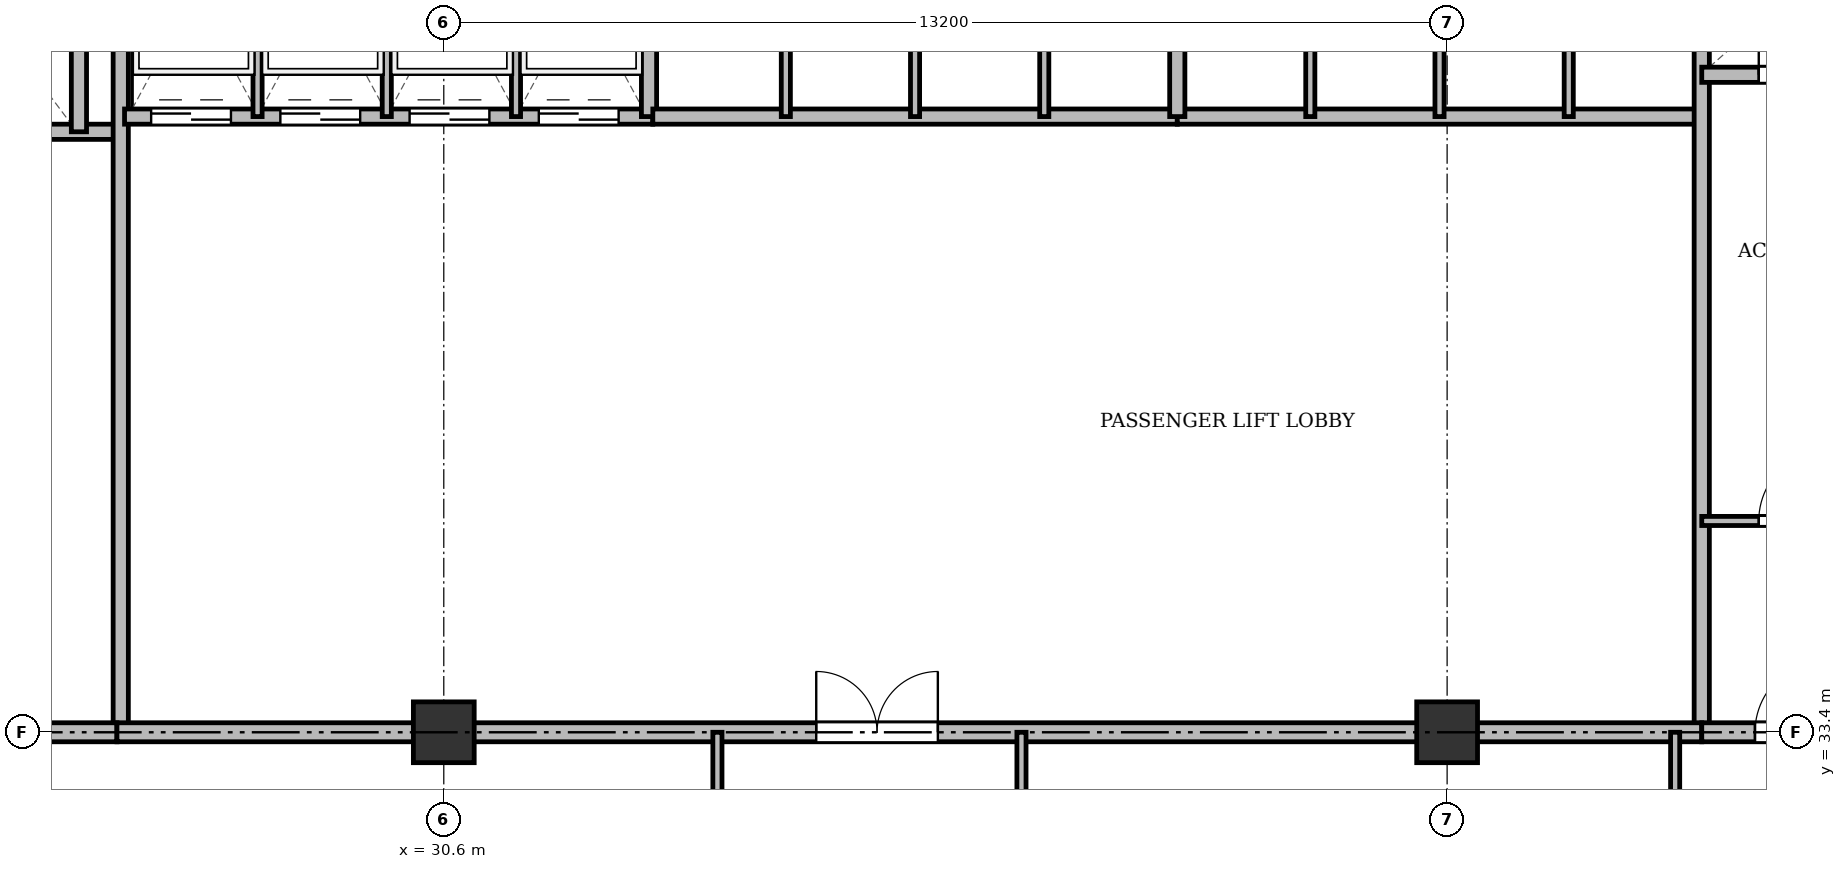
"""IFC4 building model, lengths in metres.
Left out: names, types, materials, properties, quantities, classifications, styles, units other than length and angle.
Written with IfcOpenShell. Run it as: python <this file> out.ifc"""

import sys

from ifc_helpers import new_model, si_unit, direction, frame, frame_2d, origin, origin_2d, place, context, subcontext, project, spatial, rectangle, extrude, source, transform, mapped, element, fill, save


model = new_model("IFC4")
c1 = context("Model", 3, precision=1e-05, world=origin(), true_north=direction((0.0, 1.0)))
c2 = subcontext(c1, "Body", "Model", "MODEL_VIEW")
j1 = project(units=[si_unit("LENGTHUNIT", "METRE"), si_unit("PLANEANGLEUNIT", "RADIAN")], contexts=[c1])
p1 = place(None, origin())
s1 = spatial("IfcSite", under=j1, at=p1, CompositionType="ELEMENT")
p2 = place(p1, origin())
s2 = spatial("IfcBuilding", under=s1, at=p2, CompositionType="ELEMENT")
p3 = place(p2, frame((0.0, 0.0, 81.7)))
s3 = spatial("IfcBuildingStorey", under=s2, at=p3, CompositionType="ELEMENT", Elevation=81.7)
m1 = source(origin(), c2, "Body", "SweptSolid", [
    extrude(rectangle(XDim=0.8, YDim=0.8, at=origin_2d()), origin(), (0.0, 0.0, 1.0), 3.6),
])
for number, where, z_axis, x_axis in (
    (1, (30.6, 33.4, 0.0), (0.0, 0.0, 1.0), (1.0, 0.0, 0.0)),
    (2, (43.8, 33.4, 0.0), (0.0, 0.0, 1.0), (1.0, 0.0, 0.0)),
):
    element("IfcColumn", number, at=place(p3, frame(where, z_axis=z_axis, x_axis=x_axis)), inside=s3, PredefinedType="COLUMN", context=c2, shape_type="MappedRepresentation", body=[
        mapped(m1, transform((0.0, 0.0, 0.0), x_axis=(1.0, 0.0, 0.0), y_axis=(0.0, 1.0, 0.0), z_axis=(0.0, 0.0, 1.0), scale=1.0)),
    ])
p4 = place(p3, frame((19.55, 41.3, 0.0), z_axis=(0.0, 0.0, 1.0), x_axis=(1.0, 0.0, 0.0)))
e3 = element("IfcWall", 3, at=p4, inside=s3, PredefinedType="SOLIDWALL", context=c2, shape_type="SweptSolid", body=[
    extrude(rectangle(XDim=6.75, YDim=0.2, at=frame_2d((3.375, 0.0))), origin(), (0.0, 0.0, 1.0), 3.34),
])
p5 = place(p4, frame((1.7, 0.0, 0.0)))
e4 = element("IfcOpeningElement", 4, at=p5, cuts=e3, PredefinedType="OPENING", context=c2, shape_type="SweptSolid", body=[
    extrude(rectangle(XDim=1.1, YDim=2.15, at=frame_2d((0.55, 1.075))), frame((0.0, 0.11, 0.0), z_axis=(0.0, -1.0, 0.0), x_axis=(1.0, 0.0, 0.0)), (0.0, 0.0, 1.0), 0.22),
])
p6 = place(p4, frame((4.4, 0.0, 0.0)))
e5 = element("IfcOpeningElement", 5, at=p6, cuts=e3, PredefinedType="OPENING", context=c2, shape_type="SweptSolid", body=[
    extrude(rectangle(XDim=1.1, YDim=2.15, at=frame_2d((0.55, 1.075))), frame((0.0, 0.11, 0.0), z_axis=(0.0, -1.0, 0.0), x_axis=(1.0, 0.0, 0.0)), (0.0, 0.0, 1.0), 0.22),
])
p7 = place(p3, frame((25.8, 41.3, 0.0), z_axis=(0.0, 0.0, 1.0), x_axis=(0.0, 1.0, 0.0)))
e6 = element("IfcWall", 6, at=p7, inside=s3, PredefinedType="SOLIDWALL", context=c2, shape_type="SweptSolid", body=[
    extrude(rectangle(XDim=3.4, YDim=0.2, at=frame_2d((1.7, 0.0))), origin(), (0.0, 0.0, 1.0), 3.34),
])
p8 = place(p3, frame((26.35, 33.4, 0.0), z_axis=(0.0, 0.0, 1.0), x_axis=(0.0, 1.0, 0.0)))
e7 = element("IfcWall", 7, at=p8, inside=s3, PredefinedType="SOLIDWALL", context=c2, shape_type="SweptSolid", body=[
    extrude(rectangle(XDim=11.3, YDim=0.2, at=frame_2d((5.65, 0.0))), origin(), (0.0, 0.0, 1.0), 2.752),
])
p9 = place(p3, frame((19.5, 33.4, 0.0), z_axis=(0.0, 0.0, 1.0), x_axis=(1.0, 0.0, 0.0)))
e8 = element("IfcWall", 8, at=p9, inside=s3, PredefinedType="PARTITIONING", context=c2, shape_type="SweptSolid", body=[
    extrude(rectangle(XDim=6.8, YDim=0.25, at=frame_2d((3.4, 0.0))), origin(), (0.0, 0.0, 1.0), 2.752),
])
p10 = place(p9, frame((0.75, 0.0, 0.0)))
e9 = element("IfcOpeningElement", 9, at=p10, cuts=e8, PredefinedType="OPENING", context=c2, shape_type="SweptSolid", body=[
    extrude(rectangle(XDim=1.6, YDim=2.2, at=frame_2d((0.8, 1.1))), frame((0.0, 0.135, 0.0), z_axis=(0.0, -1.0, 0.0), x_axis=(1.0, 0.0, 0.0)), (0.0, 0.0, 1.0), 0.27),
])
p11 = place(p3, frame((26.4, 41.5, 0.0), z_axis=(0.0, 0.0, 1.0), x_axis=(1.0, 0.0, 0.0)))
e10 = element("IfcWall", 10, at=p11, inside=s3, PredefinedType="SOLIDWALL", context=c2, shape_type="SweptSolid", body=[
    extrude(rectangle(XDim=6.95, YDim=0.2, at=frame_2d((3.475, 0.0))), origin(), (0.0, 0.0, 1.0), 3.34),
])
p12 = place(p11, frame((0.35, 0.0, 0.0)))
e11 = element("IfcOpeningElement", 11, at=p12, cuts=e10, PredefinedType="OPENING", context=c2, shape_type="SweptSolid", body=[
    extrude(rectangle(XDim=1.05, YDim=2.15, at=frame_2d((0.525, 1.075))), frame((0.0, 0.11, 0.0), z_axis=(0.0, -1.0, 0.0), x_axis=(1.0, 0.0, 0.0)), (0.0, 0.0, 1.0), 0.22),
])
p13 = place(p11, frame((2.05, 0.0, 0.0)))
e12 = element("IfcOpeningElement", 12, at=p13, cuts=e10, PredefinedType="OPENING", context=c2, shape_type="SweptSolid", body=[
    extrude(rectangle(XDim=1.05, YDim=2.15, at=frame_2d((0.525, 1.075))), frame((0.0, 0.11, 0.0), z_axis=(0.0, -1.0, 0.0), x_axis=(1.0, 0.0, 0.0)), (0.0, 0.0, 1.0), 0.22),
])
p14 = place(p11, frame((3.75, 0.0, 0.0)))
e13 = element("IfcOpeningElement", 13, at=p14, cuts=e10, PredefinedType="OPENING", context=c2, shape_type="SweptSolid", body=[
    extrude(rectangle(XDim=1.05, YDim=2.15, at=frame_2d((0.525, 1.075))), frame((0.0, 0.11, 0.0), z_axis=(0.0, -1.0, 0.0), x_axis=(1.0, 0.0, 0.0)), (0.0, 0.0, 1.0), 0.22),
])
p15 = place(p11, frame((5.45, 0.0, 0.0)))
e14 = element("IfcOpeningElement", 14, at=p15, cuts=e10, PredefinedType="OPENING", context=c2, shape_type="SweptSolid", body=[
    extrude(rectangle(XDim=1.05, YDim=2.15, at=frame_2d((0.525, 1.075))), frame((0.0, 0.11, 0.0), z_axis=(0.0, -1.0, 0.0), x_axis=(1.0, 0.0, 0.0)), (0.0, 0.0, 1.0), 0.22),
])
p16 = place(p3, frame((33.3, 41.5, 0.0), z_axis=(0.0, 0.0, 1.0), x_axis=(0.0, 1.0, 0.0)))
e15 = element("IfcWall", 15, at=p16, inside=s3, PredefinedType="SOLIDWALL", context=c2, shape_type="SweptSolid", body=[
    extrude(rectangle(XDim=3.2, YDim=0.2, at=frame_2d((1.6, 0.0))), origin(), (0.0, 0.0, 1.0), 3.34),
])
for number, where, z_axis, x_axis in (
    (16, (28.15, 41.5, 0.0), (0.0, 0.0, 1.0), (0.0, 1.0, 0.0)),
    (17, (29.85, 41.5, 0.0), (0.0, 0.0, 1.0), (0.0, 1.0, 0.0)),
    (18, (31.55, 41.5, 0.0), (0.0, 0.0, 1.0), (0.0, 1.0, 0.0)),
):
    element("IfcWall", number, at=place(p3, frame(where, z_axis=z_axis, x_axis=x_axis)), inside=s3, PredefinedType="PARTITIONING", context=c2, shape_type="SweptSolid", body=[
        extrude(rectangle(XDim=3.2, YDim=0.12, at=frame_2d((1.6, 0.0))), origin(), (0.0, 0.0, 1.0), 3.34),
    ])
p17 = place(p3, frame((33.35, 41.5, 0.0), z_axis=(0.0, 0.0, 1.0), x_axis=(1.0, 0.0, 0.0)))
e19 = element("IfcWall", 19, at=p17, inside=s3, PredefinedType="SOLIDWALL", context=c2, shape_type="SweptSolid", body=[
    extrude(rectangle(XDim=6.9, YDim=0.2, at=frame_2d((3.45, 0.0))), origin(), (0.0, 0.0, 1.0), 3.34),
])
for number, where, z_axis, x_axis in (
    (20, (35.1, 41.5, 0.0), (0.0, 0.0, 1.0), (0.0, 1.0, 0.0)),
    (21, (36.8, 41.5, 0.0), (0.0, 0.0, 1.0), (0.0, 1.0, 0.0)),
    (22, (38.5, 41.5, 0.0), (0.0, 0.0, 1.0), (0.0, 1.0, 0.0)),
):
    element("IfcWall", number, at=place(p3, frame(where, z_axis=z_axis, x_axis=x_axis)), inside=s3, PredefinedType="PARTITIONING", context=c2, shape_type="SweptSolid", body=[
        extrude(rectangle(XDim=3.2, YDim=0.12, at=frame_2d((1.6, 0.0))), origin(), (0.0, 0.0, 1.0), 3.34),
    ])
p18 = place(p3, frame((40.25, 41.5, 0.0), z_axis=(0.0, 0.0, 1.0), x_axis=(1.0, 0.0, 0.0)))
e23 = element("IfcWall", 23, at=p18, inside=s3, PredefinedType="SOLIDWALL", context=c2, shape_type="SweptSolid", body=[
    extrude(rectangle(XDim=6.9, YDim=0.2, at=frame_2d((3.45, 0.0))), origin(), (0.0, 0.0, 1.0), 2.84),
])
p19 = place(p3, frame((40.25, 41.5, 0.0), z_axis=(0.0, 0.0, 1.0), x_axis=(0.0, 1.0, 0.0)))
e24 = element("IfcWall", 24, at=p19, inside=s3, PredefinedType="SOLIDWALL", context=c2, shape_type="SweptSolid", body=[
    extrude(rectangle(XDim=3.2, YDim=0.2, at=frame_2d((1.6, 0.0))), origin(), (0.0, 0.0, 1.0), 3.34),
])
p20 = place(p3, frame((42.0, 41.5, 0.0), z_axis=(0.0, 0.0, 1.0), x_axis=(0.0, 1.0, 0.0)))
e25 = element("IfcWall", 25, at=p20, inside=s3, PredefinedType="PARTITIONING", context=c2, shape_type="SweptSolid", body=[
    extrude(rectangle(XDim=3.2, YDim=0.12, at=frame_2d((1.6, 0.0))), origin(), (0.0, 0.0, 1.0), 3.34),
])
p21 = place(p3, frame((43.7, 41.5, 0.0), z_axis=(0.0, 0.0, 1.0), x_axis=(0.0, 1.0, 0.0)))
e26 = element("IfcWall", 26, at=p21, inside=s3, PredefinedType="PARTITIONING", context=c2, shape_type="SweptSolid", body=[
    extrude(rectangle(XDim=3.2, YDim=0.12, at=frame_2d((1.6, 0.0))), origin(), (0.0, 0.0, 1.0), 2.84),
])
p22 = place(p3, frame((45.4, 41.5, 0.0), z_axis=(0.0, 0.0, 1.0), x_axis=(0.0, 1.0, 0.0)))
e27 = element("IfcWall", 27, at=p22, inside=s3, PredefinedType="PARTITIONING", context=c2, shape_type="SweptSolid", body=[
    extrude(rectangle(XDim=3.2, YDim=0.12, at=frame_2d((1.6, 0.0))), origin(), (0.0, 0.0, 1.0), 3.34),
])
p23 = place(p3, frame((47.15, 33.4, 0.0), z_axis=(0.0, 0.0, 1.0), x_axis=(0.0, 1.0, 0.0)))
e28 = element("IfcWall", 28, at=p23, inside=s3, PredefinedType="SOLIDWALL", context=c2, shape_type="SweptSolid", body=[
    extrude(rectangle(XDim=11.3, YDim=0.2, at=frame_2d((5.65, 0.0))), origin(), (0.0, 0.0, 1.0), 2.752),
])
p24 = place(p3, frame((26.3, 33.4, 0.0), z_axis=(0.0, 0.0, 1.0), x_axis=(1.0, 0.0, 0.0)))
e29 = element("IfcWall", 29, at=p24, inside=s3, PredefinedType="PARTITIONING", context=c2, shape_type="SweptSolid", body=[
    extrude(rectangle(XDim=20.85, YDim=0.25, at=frame_2d((10.425, 0.0))), origin(), (0.0, 0.0, 1.0), 2.752),
])
p25 = place(p24, frame((9.2, 0.0, 0.0)))
e30 = element("IfcOpeningElement", 30, at=p25, cuts=e29, PredefinedType="OPENING", context=c2, shape_type="SweptSolid", body=[
    extrude(rectangle(XDim=1.6, YDim=2.2, at=frame_2d((0.8, 1.1))), frame((0.0, 0.135, 0.0), z_axis=(0.0, -1.0, 0.0), x_axis=(1.0, 0.0, 0.0)), (0.0, 0.0, 1.0), 0.27),
])
p26 = place(p3, frame((47.15, 42.05, 0.0), z_axis=(0.0, 0.0, 1.0), x_axis=(1.0, 0.0, 0.0)))
e31 = element("IfcWall", 31, at=p26, inside=s3, PredefinedType="SOLIDWALL", context=c2, shape_type="SweptSolid", body=[
    extrude(rectangle(XDim=7.85, YDim=0.2, at=frame_2d((3.925, 0.0))), origin(), (0.0, 0.0, 1.0), 2.84),
])
p27 = place(p26, frame((0.75, 0.0, 0.0)))
e32 = element("IfcOpeningElement", 32, at=p27, cuts=e31, PredefinedType="OPENING", context=c2, shape_type="SweptSolid", body=[
    extrude(rectangle(XDim=0.9, YDim=2.1, at=frame_2d((0.45, 1.05))), frame((0.0, 0.11, 0.0), z_axis=(0.0, -1.0, 0.0), x_axis=(1.0, 0.0, 0.0)), (0.0, 0.0, 1.0), 0.22),
])
p28 = place(p26, frame((3.85, 0.0, 0.0)))
e33 = element("IfcOpeningElement", 33, at=p28, cuts=e31, PredefinedType="OPENING", context=c2, shape_type="SweptSolid", body=[
    extrude(rectangle(XDim=0.9, YDim=2.1, at=frame_2d((0.45, 1.05))), frame((0.0, 0.11, 0.0), z_axis=(0.0, -1.0, 0.0), x_axis=(1.0, 0.0, 0.0)), (0.0, 0.0, 1.0), 0.22),
])
p29 = place(p3, frame((47.15, 36.18, 0.0), z_axis=(0.0, 0.0, 1.0), x_axis=(1.0, 0.0, 0.0)))
e34 = element("IfcWall", 34, at=p29, inside=s3, PredefinedType="PARTITIONING", context=c2, shape_type="SweptSolid", body=[
    extrude(rectangle(XDim=5.3, YDim=0.12, at=frame_2d((2.65, 0.0))), origin(), (0.0, 0.0, 1.0), 2.84),
])
p30 = place(p29, frame((0.75, 0.0, 0.0)))
e35 = element("IfcOpeningElement", 35, at=p30, cuts=e34, PredefinedType="OPENING", context=c2, shape_type="SweptSolid", body=[
    extrude(rectangle(XDim=0.95, YDim=2.15, at=frame_2d((0.475, 1.075))), frame((0.0, 0.07, 0.0), z_axis=(0.0, -1.0, 0.0), x_axis=(1.0, 0.0, 0.0)), (0.0, 0.0, 1.0), 0.14),
])
p31 = place(p29, frame((3.45, 0.0, 0.0)))
e36 = element("IfcOpeningElement", 36, at=p31, cuts=e34, PredefinedType="OPENING", context=c2, shape_type="SweptSolid", body=[
    extrude(rectangle(XDim=0.95, YDim=2.15, at=frame_2d((0.475, 1.075))), frame((0.0, 0.07, 0.0), z_axis=(0.0, -1.0, 0.0), x_axis=(1.0, 0.0, 0.0)), (0.0, 0.0, 1.0), 0.14),
])
p32 = place(p3, frame((47.15, 33.4, 0.0), z_axis=(0.0, 0.0, 1.0), x_axis=(1.0, 0.0, 0.0)))
e37 = element("IfcWall", 37, at=p32, inside=s3, PredefinedType="PARTITIONING", context=c2, shape_type="SweptSolid", body=[
    extrude(rectangle(XDim=11.15, YDim=0.25, at=frame_2d((5.575, 0.0))), origin(), (0.0, 0.0, 1.0), 2.752),
])
p33 = place(p32, frame((0.7, 0.0, 0.0)))
e38 = element("IfcOpeningElement", 38, at=p33, cuts=e37, PredefinedType="OPENING", context=c2, shape_type="SweptSolid", body=[
    extrude(rectangle(XDim=0.95, YDim=2.15, at=frame_2d((0.475, 1.075))), frame((0.0, 0.135, 0.0), z_axis=(0.0, -1.0, 0.0), x_axis=(1.0, 0.0, 0.0)), (0.0, 0.0, 1.0), 0.27),
])
p34 = place(p32, frame((6.0, 0.0, 0.0)))
e39 = element("IfcOpeningElement", 39, at=p34, cuts=e37, PredefinedType="OPENING", context=c2, shape_type="SweptSolid", body=[
    extrude(rectangle(XDim=1.2, YDim=2.15, at=frame_2d((0.6, 1.075))), frame((0.0, 0.135, 0.0), z_axis=(0.0, -1.0, 0.0), x_axis=(1.0, 0.0, 0.0)), (0.0, 0.0, 1.0), 0.27),
])
for number, where, z_axis, x_axis in (
    (40, (34.2, 29.8, 0.0), (0.0, 0.0, 1.0), (0.0, 1.0, 0.0)),
    (41, (38.2, 29.8, 0.0), (0.0, 0.0, 1.0), (0.0, 1.0, 0.0)),
    (42, (46.8, 29.8, 0.0), (0.0, 0.0, 1.0), (0.0, 1.0, 0.0)),
):
    element("IfcWall", number, at=place(p3, frame(where, z_axis=z_axis, x_axis=x_axis)), inside=s3, PredefinedType="PARTITIONING", context=c2, shape_type="SweptSolid", body=[
        extrude(rectangle(XDim=3.6, YDim=0.12, at=frame_2d((1.8, 0.0))), origin(), (0.0, 0.0, 1.0), 2.752),
    ])
m2 = source(origin(), c2, "Body", "SweptSolid", [
    extrude(rectangle(XDim=1.05, YDim=2.15, at=frame_2d((0.525, 1.075))), frame((0.0, 0.025, 0.0), z_axis=(0.0, -1.0, 0.0), x_axis=(1.0, 0.0, 0.0)), (0.0, 0.0, 1.0), 0.05),
])
p35 = place(p12, origin())
e43 = element("IfcDoor", 43, at=p35, inside=s3, OperationType="DOUBLE_DOOR_SLIDING", PredefinedType="DOOR", context=c2, shape_type="MappedRepresentation", body=[
    mapped(m2, transform((0.0, 0.0, 0.0), x_axis=(1.0, 0.0, 0.0), y_axis=(0.0, 1.0, 0.0), z_axis=(0.0, 0.0, 1.0), scale=1.0)),
])
fill(e11, e43)
p36 = place(p13, origin())
e44 = element("IfcDoor", 44, at=p36, inside=s3, OperationType="DOUBLE_DOOR_SLIDING", PredefinedType="DOOR", context=c2, shape_type="MappedRepresentation", body=[
    mapped(m2, transform((0.0, 0.0, 0.0), x_axis=(1.0, 0.0, 0.0), y_axis=(0.0, 1.0, 0.0), z_axis=(0.0, 0.0, 1.0), scale=1.0)),
])
fill(e12, e44)
p37 = place(p14, origin())
e45 = element("IfcDoor", 45, at=p37, inside=s3, OperationType="DOUBLE_DOOR_SLIDING", PredefinedType="DOOR", context=c2, shape_type="MappedRepresentation", body=[
    mapped(m2, transform((0.0, 0.0, 0.0), x_axis=(1.0, 0.0, 0.0), y_axis=(0.0, 1.0, 0.0), z_axis=(0.0, 0.0, 1.0), scale=1.0)),
])
fill(e13, e45)
p38 = place(p15, origin())
e46 = element("IfcDoor", 46, at=p38, inside=s3, OperationType="DOUBLE_DOOR_SLIDING", PredefinedType="DOOR", context=c2, shape_type="MappedRepresentation", body=[
    mapped(m2, transform((0.0, 0.0, 0.0), x_axis=(1.0, 0.0, 0.0), y_axis=(0.0, 1.0, 0.0), z_axis=(0.0, 0.0, 1.0), scale=1.0)),
])
fill(e14, e46)
m3 = source(origin(), c2, "Body", "SweptSolid", [
    extrude(rectangle(XDim=1.6, YDim=2.2, at=frame_2d((0.8, 1.1))), frame((0.0, 0.025, 0.0), z_axis=(0.0, -1.0, 0.0), x_axis=(1.0, 0.0, 0.0)), (0.0, 0.0, 1.0), 0.05),
])
p39 = place(p25, origin())
e47 = element("IfcDoor", 47, at=p39, inside=s3, OperationType="DOUBLE_DOOR_SINGLE_SWING", PredefinedType="DOOR", context=c2, shape_type="MappedRepresentation", body=[
    mapped(m3, transform((0.0, 0.0, 0.0), x_axis=(1.0, 0.0, 0.0), y_axis=(0.0, 1.0, 0.0), z_axis=(0.0, 0.0, 1.0), scale=1.0)),
])
fill(e30, e47)
m4 = source(origin(), c2, "Body", "SweptSolid", [
    extrude(rectangle(XDim=0.9, YDim=2.1, at=frame_2d((0.45, 1.05))), frame((0.0, 0.025, 0.0), z_axis=(0.0, -1.0, 0.0), x_axis=(1.0, 0.0, 0.0)), (0.0, 0.0, 1.0), 0.05),
])
p40 = place(p27, origin())
e48 = element("IfcDoor", 48, at=p40, inside=s3, OperationType="SINGLE_SWING_LEFT", PredefinedType="DOOR", context=c2, shape_type="MappedRepresentation", body=[
    mapped(m4, transform((0.0, 0.0, 0.0), x_axis=(1.0, 0.0, 0.0), y_axis=(0.0, 1.0, 0.0), z_axis=(0.0, 0.0, 1.0), scale=1.0)),
])
fill(e32, e48)
m5 = source(origin(), c2, "Body", "SweptSolid", [
    extrude(rectangle(XDim=0.95, YDim=2.15, at=frame_2d((0.475, 1.075))), frame((0.0, 0.025, 0.0), z_axis=(0.0, -1.0, 0.0), x_axis=(1.0, 0.0, 0.0)), (0.0, 0.0, 1.0), 0.05),
])
p41 = place(p30, origin())
e49 = element("IfcDoor", 49, at=p41, inside=s3, OperationType="SINGLE_SWING_RIGHT", PredefinedType="DOOR", context=c2, shape_type="MappedRepresentation", body=[
    mapped(m5, transform((0.0, 0.0, 0.0), x_axis=(1.0, 0.0, 0.0), y_axis=(0.0, 1.0, 0.0), z_axis=(0.0, 0.0, 1.0), scale=1.0)),
])
fill(e35, e49)
p42 = place(p33, origin())
e50 = element("IfcDoor", 50, at=p42, inside=s3, OperationType="SINGLE_SWING_RIGHT", PredefinedType="DOOR", context=c2, shape_type="MappedRepresentation", body=[
    mapped(m5, transform((0.0, 0.0, 0.0), x_axis=(1.0, 0.0, 0.0), y_axis=(0.0, 1.0, 0.0), z_axis=(0.0, 0.0, 1.0), scale=1.0)),
])
fill(e38, e50)
save(model, sys.argv[1])
